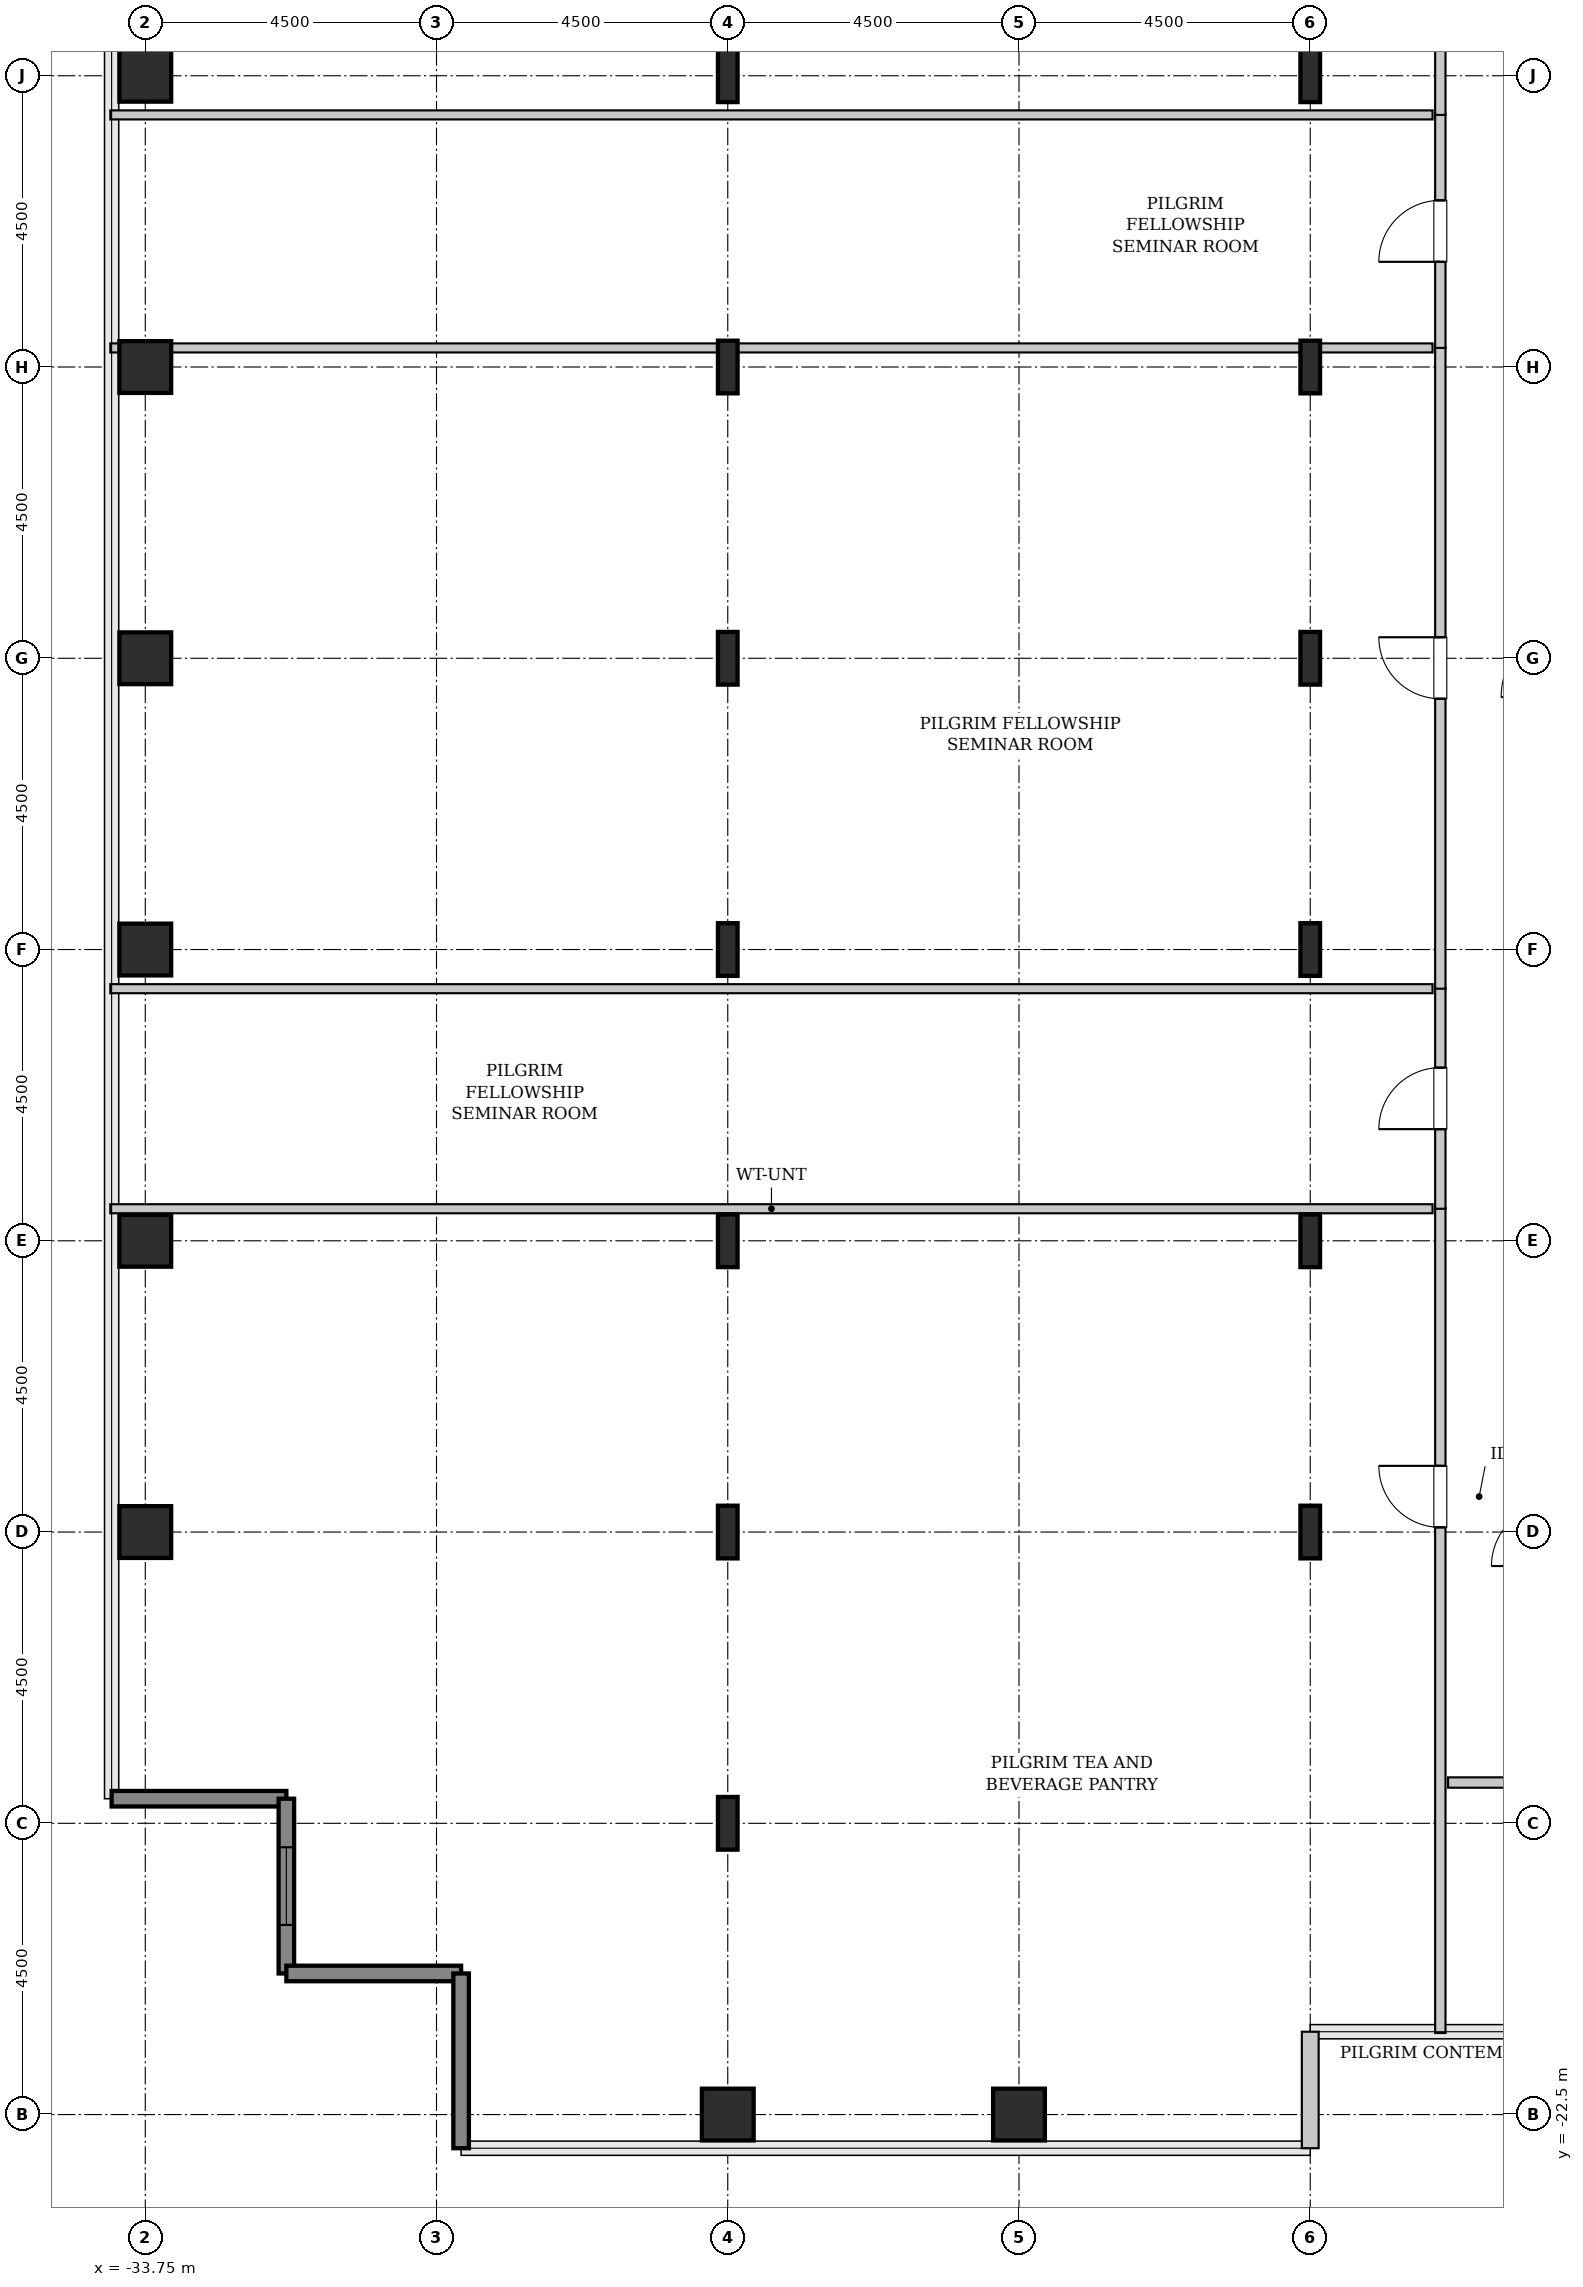
"""IFC4 building model, lengths in metres.
Left out: names, types, materials, properties, quantities, classifications, styles, units other than length and angle.
Written with IfcOpenShell. Run it as: python <this file> out.ifc"""

import sys

from ifc_helpers import new_model, si_unit, direction, frame, frame_2d, origin, origin_2d, place, context, subcontext, project, spatial, rectangle, hollow_rectangle, i_section, extrude, source, transform, mapped, element, fill, save


model = new_model("IFC4")
c1 = context("Model", 3, precision=1e-05, world=origin(), true_north=direction((0.0, 1.0)))
c2 = subcontext(c1, "Body", "Model", "MODEL_VIEW")
j1 = project(units=[si_unit("LENGTHUNIT", "METRE"), si_unit("PLANEANGLEUNIT", "RADIAN")], contexts=[c1])
p1 = place(None, origin())
s1 = spatial("IfcSite", under=j1, at=p1, CompositionType="ELEMENT")
p2 = place(p1, origin())
s2 = spatial("IfcBuilding", under=s1, at=p2, CompositionType="ELEMENT")
p3 = place(p2, frame((0.0, 0.0, 167.8)))
s3 = spatial("IfcBuildingStorey", under=s2, at=p3, CompositionType="ELEMENT", Elevation=167.8)
m1 = source(origin(), c2, "Body", "SweptSolid", [
    extrude(hollow_rectangle(XDim=0.8, YDim=0.8, WallThickness=0.04, InnerFilletRadius=0.04, OuterFilletRadius=0.08, at=origin_2d()), origin(), (0.0, 0.0, 1.0), 3.8),
])
for number, where, z_axis, x_axis in (
    (1, (-33.75, -13.5, 0.0), (0.0, 0.0, 1.0), (1.0, 0.0, 0.0)),
    (2, (-33.75, -9.0, 0.0), (0.0, 0.0, 1.0), (1.0, 0.0, 0.0)),
    (3, (-33.75, -4.5, 0.0), (0.0, 0.0, 1.0), (1.0, 0.0, 0.0)),
    (4, (-33.75, 0.0, 0.0), (0.0, 0.0, 1.0), (1.0, 0.0, 0.0)),
    (5, (-33.75, 4.5, 0.0), (0.0, 0.0, 1.0), (1.0, 0.0, 0.0)),
    (6, (-33.75, 9.0, 0.0), (0.0, 0.0, 1.0), (1.0, 0.0, 0.0)),
    (7, (-24.75, -22.5, 0.0), (0.0, 0.0, 1.0), (1.0, 0.0, 0.0)),
):
    element("IfcColumn", number, at=place(p3, frame(where, z_axis=z_axis, x_axis=x_axis)), inside=s3, PredefinedType="COLUMN", context=c2, shape_type="MappedRepresentation", body=[
        mapped(m1, transform((0.0, 0.0, 0.0), x_axis=(1.0, 0.0, 0.0), y_axis=(0.0, 1.0, 0.0), z_axis=(0.0, 0.0, 1.0), scale=1.0)),
    ])
m2 = source(origin(), c2, "Body", "SweptSolid", [
    extrude(i_section(OverallWidth=0.303, OverallDepth=0.814, WebThickness=0.021, FlangeThickness=0.04, FilletRadius=0.03, at=origin_2d()), origin(), (0.0, 0.0, 1.0), 3.8),
])
for number, where, z_axis, x_axis in (
    (8, (-24.75, -18.0, 0.0), (0.0, 0.0, 1.0), (1.0, 0.0, 0.0)),
    (9, (-24.75, -13.5, 0.0), (0.0, 0.0, 1.0), (1.0, 0.0, 0.0)),
    (10, (-24.75, -9.0, 0.0), (0.0, 0.0, 1.0), (1.0, 0.0, 0.0)),
    (11, (-24.75, -4.5, 0.0), (0.0, 0.0, 1.0), (1.0, 0.0, 0.0)),
    (12, (-24.75, 0.0, 0.0), (0.0, 0.0, 1.0), (1.0, 0.0, 0.0)),
    (13, (-24.75, 4.5, 0.0), (0.0, 0.0, 1.0), (1.0, 0.0, 0.0)),
    (14, (-24.75, 9.0, 0.0), (0.0, 0.0, 1.0), (1.0, 0.0, 0.0)),
):
    element("IfcColumn", number, at=place(p3, frame(where, z_axis=z_axis, x_axis=x_axis)), inside=s3, PredefinedType="COLUMN", context=c2, shape_type="MappedRepresentation", body=[
        mapped(m2, transform((0.0, 0.0, 0.0), x_axis=(1.0, 0.0, 0.0), y_axis=(0.0, 1.0, 0.0), z_axis=(0.0, 0.0, 1.0), scale=1.0)),
    ])
p4 = place(p3, frame((-20.25, -22.5, 0.0), z_axis=(0.0, 0.0, 1.0), x_axis=(1.0, 0.0, 0.0)))
e15 = element("IfcColumn", 15, at=p4, inside=s3, PredefinedType="COLUMN", context=c2, shape_type="MappedRepresentation", body=[
    mapped(m1, transform((0.0, 0.0, 0.0), x_axis=(1.0, 0.0, 0.0), y_axis=(0.0, 1.0, 0.0), z_axis=(0.0, 0.0, 1.0), scale=1.0)),
])
for number, where, z_axis, x_axis in (
    (16, (-15.75, -13.5, 0.0), (0.0, 0.0, 1.0), (1.0, 0.0, 0.0)),
    (17, (-15.75, -9.0, 0.0), (0.0, 0.0, 1.0), (1.0, 0.0, 0.0)),
    (18, (-15.75, -4.5, 0.0), (0.0, 0.0, 1.0), (1.0, 0.0, 0.0)),
    (19, (-15.75, 0.0, 0.0), (0.0, 0.0, 1.0), (1.0, 0.0, 0.0)),
    (20, (-15.75, 4.5, 0.0), (0.0, 0.0, 1.0), (1.0, 0.0, 0.0)),
    (21, (-15.75, 9.0, 0.0), (0.0, 0.0, 1.0), (1.0, 0.0, 0.0)),
):
    element("IfcColumn", number, at=place(p3, frame(where, z_axis=z_axis, x_axis=x_axis)), inside=s3, PredefinedType="COLUMN", context=c2, shape_type="MappedRepresentation", body=[
        mapped(m2, transform((0.0, 0.0, 0.0), x_axis=(1.0, 0.0, 0.0), y_axis=(0.0, 1.0, 0.0), z_axis=(0.0, 0.0, 1.0), scale=1.0)),
    ])
m3 = source(origin(), c2, "Body", "SweptSolid", [
    extrude(rectangle(XDim=2.7, YDim=0.24, at=frame_2d((1.35, 0.0))), origin(), (0.0, 0.0, 1.0), 3.55),
])
p5 = place(p3, frame((-34.27, -17.62, 0.0), z_axis=(0.0, 0.0, 1.0), x_axis=(1.0, 0.0, 0.0)))
e22 = element("IfcWall", 22, at=p5, inside=s3, PredefinedType="SHEAR", context=c2, shape_type="MappedRepresentation", body=[
    mapped(m3, transform((0.0, 0.0, 0.0), x_axis=(1.0, 0.0, 0.0), y_axis=(0.0, 1.0, 0.0), z_axis=(0.0, 0.0, 1.0), scale=1.0)),
])
p6 = place(p3, frame((-31.57, -17.62, 0.0), z_axis=(0.0, 0.0, 1.0), x_axis=(0.0, -1.0, 0.0)))
e23 = element("IfcWall", 23, at=p6, inside=s3, PredefinedType="SHEAR", context=c2, shape_type="MappedRepresentation", body=[
    mapped(m3, transform((0.0, 0.0, 0.0), x_axis=(1.0, 0.0, 0.0), y_axis=(0.0, 1.0, 0.0), z_axis=(0.0, 0.0, 1.0), scale=1.0)),
])
p7 = place(p6, frame((0.75, 0.0, 0.85)))
e24 = element("IfcOpeningElement", 24, at=p7, cuts=e23, PredefinedType="OPENING", context=c2, shape_type="SweptSolid", body=[
    extrude(rectangle(XDim=1.2, YDim=1.8, at=frame_2d((0.6, 0.9))), frame((0.0, 0.13, 0.0), z_axis=(0.0, -1.0, 0.0), x_axis=(1.0, 0.0, 0.0)), (0.0, 0.0, 1.0), 0.26),
])
for number, where, z_axis, x_axis in (
    (25, (-31.57, -20.32, 0.0), (0.0, 0.0, 1.0), (1.0, 0.0, 0.0)),
    (26, (-28.87, -20.32, 0.0), (0.0, 0.0, 1.0), (0.0, -1.0, 0.0)),
):
    element("IfcWall", number, at=place(p3, frame(where, z_axis=z_axis, x_axis=x_axis)), inside=s3, PredefinedType="SHEAR", context=c2, shape_type="MappedRepresentation", body=[
        mapped(m3, transform((0.0, 0.0, 0.0), x_axis=(1.0, 0.0, 0.0), y_axis=(0.0, 1.0, 0.0), z_axis=(0.0, 0.0, 1.0), scale=1.0)),
    ])
m4 = source(origin(), c2, "Body", "SweptSolid", [
    extrude(rectangle(XDim=1.8, YDim=0.26, at=frame_2d((0.9, 0.0))), origin(), (0.0, 0.0, 1.0), 3.55),
])
p8 = place(p3, frame((-15.75, -23.02, 0.0), z_axis=(0.0, 0.0, 1.0), x_axis=(0.0, 1.0, 0.0)))
e27 = element("IfcWall", 27, at=p8, inside=s3, PredefinedType="SOLIDWALL", context=c2, shape_type="MappedRepresentation", body=[
    mapped(m4, transform((0.0, 0.0, 0.0), x_axis=(1.0, 0.0, 0.0), y_axis=(0.0, 1.0, 0.0), z_axis=(0.0, 0.0, 1.0), scale=1.0)),
])
m5 = source(origin(), c2, "Body", "SweptSolid", [
    extrude(rectangle(XDim=12.745, YDim=0.16, at=frame_2d((6.373, 0.0))), origin(), (0.0, 0.0, 1.0), 3.535),
])
p9 = place(p3, frame((-13.74, -21.24, 0.0), z_axis=(0.0, 0.0, 1.0), x_axis=(0.0, 1.0, 0.0)))
e28 = element("IfcWall", 28, at=p9, inside=s3, PredefinedType="PARTITIONING", context=c2, shape_type="MappedRepresentation", body=[
    mapped(m5, transform((0.0, 0.0, 0.0), x_axis=(1.0, 0.0, 0.0), y_axis=(0.0, 1.0, 0.0), z_axis=(0.0, 0.0, 1.0), scale=1.0)),
])
p10 = place(p9, frame((7.812, 0.0, 0.0)))
e29 = element("IfcOpeningElement", 29, at=p10, cuts=e28, PredefinedType="OPENING", context=c2, shape_type="SweptSolid", body=[
    extrude(rectangle(XDim=0.95, YDim=2.1, at=frame_2d((0.475, 1.05))), frame((0.0, 0.09, 0.0), z_axis=(0.0, -1.0, 0.0), x_axis=(1.0, 0.0, 0.0)), (0.0, 0.0, 1.0), 0.18),
])
m6 = source(origin(), c2, "Body", "SweptSolid", [
    extrude(rectangle(XDim=20.43, YDim=0.14, at=frame_2d((10.215, 0.0))), origin(), (0.0, 0.0, 1.0), 2.875),
])
p11 = place(p3, frame((-34.29, -8.505, 0.0), z_axis=(0.0, 0.0, 1.0), x_axis=(1.0, 0.0, 0.0)))
e30 = element("IfcWall", 30, at=p11, inside=s3, PredefinedType="PARTITIONING", context=c2, shape_type="MappedRepresentation", body=[
    mapped(m6, transform((0.0, 0.0, 0.0), x_axis=(1.0, 0.0, 0.0), y_axis=(0.0, 1.0, 0.0), z_axis=(0.0, 0.0, 1.0), scale=1.0)),
])
m7 = source(origin(), c2, "Body", "SweptSolid", [
    extrude(rectangle(XDim=3.41, YDim=0.16, at=frame_2d((1.705, 0.0))), origin(), (0.0, 0.0, 1.0), 3.535),
])
p12 = place(p3, frame((-13.74, -8.505, 0.0), z_axis=(0.0, 0.0, 1.0), x_axis=(0.0, 1.0, 0.0)))
e31 = element("IfcWall", 31, at=p12, inside=s3, PredefinedType="PARTITIONING", context=c2, shape_type="MappedRepresentation", body=[
    mapped(m7, transform((0.0, 0.0, 0.0), x_axis=(1.0, 0.0, 0.0), y_axis=(0.0, 1.0, 0.0), z_axis=(0.0, 0.0, 1.0), scale=1.0)),
])
p13 = place(p12, frame((1.23, 0.0, 0.0)))
e32 = element("IfcOpeningElement", 32, at=p13, cuts=e31, PredefinedType="OPENING", context=c2, shape_type="SweptSolid", body=[
    extrude(rectangle(XDim=0.95, YDim=2.1, at=frame_2d((0.475, 1.05))), frame((0.0, 0.09, 0.0), z_axis=(0.0, -1.0, 0.0), x_axis=(1.0, 0.0, 0.0)), (0.0, 0.0, 1.0), 0.18),
])
m8 = source(origin(), c2, "Body", "SweptSolid", [
    extrude(rectangle(XDim=20.43, YDim=0.14, at=frame_2d((10.215, 0.0))), origin(), (0.0, 0.0, 1.0), 3.535),
])
p14 = place(p3, frame((-34.29, -5.105, 0.0), z_axis=(0.0, 0.0, 1.0), x_axis=(1.0, 0.0, 0.0)))
e33 = element("IfcWall", 33, at=p14, inside=s3, PredefinedType="PARTITIONING", context=c2, shape_type="MappedRepresentation", body=[
    mapped(m8, transform((0.0, 0.0, 0.0), x_axis=(1.0, 0.0, 0.0), y_axis=(0.0, 1.0, 0.0), z_axis=(0.0, 0.0, 1.0), scale=1.0)),
])
m9 = source(origin(), c2, "Body", "SweptSolid", [
    extrude(rectangle(XDim=9.91, YDim=0.16, at=frame_2d((4.955, 0.0))), origin(), (0.0, 0.0, 1.0), 3.535),
])
p15 = place(p3, frame((-13.74, -5.105, 0.0), z_axis=(0.0, 0.0, 1.0), x_axis=(0.0, 1.0, 0.0)))
e34 = element("IfcWall", 34, at=p15, inside=s3, PredefinedType="PARTITIONING", context=c2, shape_type="MappedRepresentation", body=[
    mapped(m9, transform((0.0, 0.0, 0.0), x_axis=(1.0, 0.0, 0.0), y_axis=(0.0, 1.0, 0.0), z_axis=(0.0, 0.0, 1.0), scale=1.0)),
])
p16 = place(p15, frame((4.48, 0.0, 0.0)))
e35 = element("IfcOpeningElement", 35, at=p16, cuts=e34, PredefinedType="OPENING", context=c2, shape_type="SweptSolid", body=[
    extrude(rectangle(XDim=0.95, YDim=2.1, at=frame_2d((0.475, 1.05))), frame((0.0, 0.09, 0.0), z_axis=(0.0, -1.0, 0.0), x_axis=(1.0, 0.0, 0.0)), (0.0, 0.0, 1.0), 0.18),
])
p17 = place(p3, frame((-34.29, 4.795, 0.0), z_axis=(0.0, 0.0, 1.0), x_axis=(1.0, 0.0, 0.0)))
e36 = element("IfcWall", 36, at=p17, inside=s3, PredefinedType="PARTITIONING", context=c2, shape_type="MappedRepresentation", body=[
    mapped(m6, transform((0.0, 0.0, 0.0), x_axis=(1.0, 0.0, 0.0), y_axis=(0.0, 1.0, 0.0), z_axis=(0.0, 0.0, 1.0), scale=1.0)),
])
m10 = source(origin(), c2, "Body", "SweptSolid", [
    extrude(rectangle(XDim=3.61, YDim=0.16, at=frame_2d((1.805, 0.0))), origin(), (0.0, 0.0, 1.0), 3.535),
])
p18 = place(p3, frame((-13.74, 4.795, 0.0), z_axis=(0.0, 0.0, 1.0), x_axis=(0.0, 1.0, 0.0)))
e37 = element("IfcWall", 37, at=p18, inside=s3, PredefinedType="PARTITIONING", context=c2, shape_type="MappedRepresentation", body=[
    mapped(m10, transform((0.0, 0.0, 0.0), x_axis=(1.0, 0.0, 0.0), y_axis=(0.0, 1.0, 0.0), z_axis=(0.0, 0.0, 1.0), scale=1.0)),
])
p19 = place(p18, frame((1.33, 0.0, 0.0)))
e38 = element("IfcOpeningElement", 38, at=p19, cuts=e37, PredefinedType="OPENING", context=c2, shape_type="SweptSolid", body=[
    extrude(rectangle(XDim=0.95, YDim=2.1, at=frame_2d((0.475, 1.05))), frame((0.0, 0.09, 0.0), z_axis=(0.0, -1.0, 0.0), x_axis=(1.0, 0.0, 0.0)), (0.0, 0.0, 1.0), 0.18),
])
p20 = place(p3, frame((-34.29, 8.395, 0.0), z_axis=(0.0, 0.0, 1.0), x_axis=(1.0, 0.0, 0.0)))
e39 = element("IfcWall", 39, at=p20, inside=s3, PredefinedType="PARTITIONING", context=c2, shape_type="MappedRepresentation", body=[
    mapped(m8, transform((0.0, 0.0, 0.0), x_axis=(1.0, 0.0, 0.0), y_axis=(0.0, 1.0, 0.0), z_axis=(0.0, 0.0, 1.0), scale=1.0)),
])
m11 = source(origin(), c2, "Body", "SweptSolid", [
    extrude(rectangle(XDim=12.845, YDim=0.16, at=frame_2d((6.422, 0.0))), origin(), (0.0, 0.0, 1.0), 3.535),
])
p21 = place(p3, frame((-13.74, 8.395, 0.0), z_axis=(0.0, 0.0, 1.0), x_axis=(0.0, 1.0, 0.0)))
e40 = element("IfcWall", 40, at=p21, inside=s3, PredefinedType="PARTITIONING", context=c2, shape_type="MappedRepresentation", body=[
    mapped(m11, transform((0.0, 0.0, 0.0), x_axis=(1.0, 0.0, 0.0), y_axis=(0.0, 1.0, 0.0), z_axis=(0.0, 0.0, 1.0), scale=1.0)),
])
p22 = place(p21, frame((4.032, 0.0, 0.0)))
e41 = element("IfcOpeningElement", 41, at=p22, cuts=e40, PredefinedType="OPENING", context=c2, shape_type="SweptSolid", body=[
    extrude(rectangle(XDim=0.95, YDim=2.1, at=frame_2d((0.475, 1.05))), frame((0.0, 0.09, 0.0), z_axis=(0.0, -1.0, 0.0), x_axis=(1.0, 0.0, 0.0)), (0.0, 0.0, 1.0), 0.18),
])
m12 = source(origin(), c2, "Body", "SweptSolid", [
    extrude(rectangle(XDim=5.025, YDim=0.16, at=frame_2d((2.513, 0.0))), origin(), (0.0, 0.0, 1.0), 3.535),
])
p23 = place(p3, frame((-13.62, -17.37, 0.0), z_axis=(0.0, 0.0, 1.0), x_axis=(1.0, 0.0, 0.0)))
e42 = element("IfcWall", 42, at=p23, inside=s3, PredefinedType="PARTITIONING", context=c2, shape_type="MappedRepresentation", body=[
    mapped(m12, transform((0.0, 0.0, 0.0), x_axis=(1.0, 0.0, 0.0), y_axis=(0.0, 1.0, 0.0), z_axis=(0.0, 0.0, 1.0), scale=1.0)),
])
p24 = place(p23, frame((2.881, 0.0, 0.0)))
e43 = element("IfcOpeningElement", 43, at=p24, cuts=e42, PredefinedType="OPENING", context=c2, shape_type="SweptSolid", body=[
    extrude(rectangle(XDim=0.95, YDim=2.1, at=frame_2d((0.475, 1.05))), frame((0.0, 0.09, 0.0), z_axis=(0.0, -1.0, 0.0), x_axis=(1.0, 0.0, 0.0)), (0.0, 0.0, 1.0), 0.18),
])
m13 = source(origin(), c2, "Body", "SweptSolid", [
    extrude(rectangle(XDim=1.2, YDim=1.8, at=frame_2d((0.6, 0.9))), frame((0.0, 0.03, 0.0), z_axis=(0.0, -1.0, 0.0), x_axis=(1.0, 0.0, 0.0)), (0.0, 0.0, 1.0), 0.06),
])
p25 = place(p7, origin())
e44 = element("IfcWindow", 44, at=p25, inside=s3, PartitioningType="SINGLE_PANEL", PredefinedType="WINDOW", context=c2, shape_type="MappedRepresentation", body=[
    mapped(m13, transform((0.0, 0.0, 0.0), x_axis=(1.0, 0.0, 0.0), y_axis=(0.0, 1.0, 0.0), z_axis=(0.0, 0.0, 1.0), scale=1.0)),
])
fill(e24, e44)
m14 = source(origin(), c2, "Body", "SweptSolid", [
    extrude(rectangle(XDim=0.95, YDim=2.1, at=frame_2d((0.475, 1.05))), frame((0.0, 0.025, 0.0), z_axis=(0.0, -1.0, 0.0), x_axis=(1.0, 0.0, 0.0)), (0.0, 0.0, 1.0), 0.05),
])
p26 = place(p10, origin())
e45 = element("IfcDoor", 45, at=p26, inside=s3, OperationType="SINGLE_SWING_RIGHT", PredefinedType="DOOR", context=c2, shape_type="MappedRepresentation", body=[
    mapped(m14, transform((0.0, 0.0, 0.0), x_axis=(1.0, 0.0, 0.0), y_axis=(0.0, 1.0, 0.0), z_axis=(0.0, 0.0, 1.0), scale=1.0)),
])
fill(e29, e45)
p27 = place(p13, origin())
e46 = element("IfcDoor", 46, at=p27, inside=s3, OperationType="SINGLE_SWING_LEFT", PredefinedType="DOOR", context=c2, shape_type="MappedRepresentation", body=[
    mapped(m14, transform((0.0, 0.0, 0.0), x_axis=(1.0, 0.0, 0.0), y_axis=(0.0, 1.0, 0.0), z_axis=(0.0, 0.0, 1.0), scale=1.0)),
])
fill(e32, e46)
p28 = place(p16, origin())
e47 = element("IfcDoor", 47, at=p28, inside=s3, OperationType="SINGLE_SWING_RIGHT", PredefinedType="DOOR", context=c2, shape_type="MappedRepresentation", body=[
    mapped(m14, transform((0.0, 0.0, 0.0), x_axis=(1.0, 0.0, 0.0), y_axis=(0.0, 1.0, 0.0), z_axis=(0.0, 0.0, 1.0), scale=1.0)),
])
fill(e35, e47)
p29 = place(p19, origin())
e48 = element("IfcDoor", 48, at=p29, inside=s3, OperationType="SINGLE_SWING_LEFT", PredefinedType="DOOR", context=c2, shape_type="MappedRepresentation", body=[
    mapped(m14, transform((0.0, 0.0, 0.0), x_axis=(1.0, 0.0, 0.0), y_axis=(0.0, 1.0, 0.0), z_axis=(0.0, 0.0, 1.0), scale=1.0)),
])
fill(e38, e48)
save(model, sys.argv[1])
